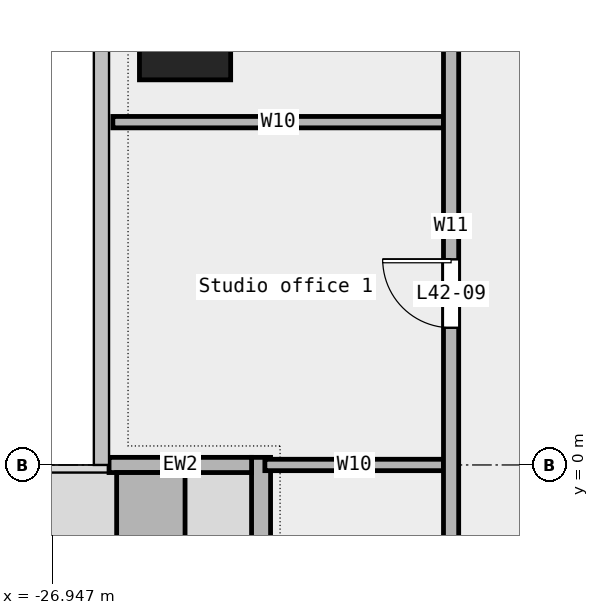
"""IFC4 building model, lengths in metres.
Left out: names, types, materials, properties, quantities, classifications, styles, units other than length and angle.
Written with IfcOpenShell. Run it as: python <this file> out.ifc"""

import sys

from ifc_helpers import new_model, si_unit, direction, frame, frame_2d, origin, origin_2d, place, context, subcontext, project, spatial, rectangle, extrude, element, fill, save


model = new_model("IFC4")
c1 = context("Model", 3, precision=1e-05, world=origin(), true_north=direction((0.0, 1.0)))
c2 = subcontext(c1, "Body", "Model", "MODEL_VIEW")
j1 = project(units=[si_unit("LENGTHUNIT", "METRE"), si_unit("PLANEANGLEUNIT", "RADIAN")], contexts=[c1])
p1 = place(None, origin())
s1 = spatial("IfcSite", under=j1, at=p1, CompositionType="ELEMENT")
p2 = place(p1, origin())
s2 = spatial("IfcBuilding", under=s1, at=p2, CompositionType="ELEMENT")
p3 = place(p2, frame((0.0, 0.0, 201.0)))
s3 = spatial("IfcBuildingStorey", under=s2, at=p3, CompositionType="ELEMENT", Elevation=201.0)
p4 = place(p3, frame((-25.2, 5.667, 0.0), z_axis=(0.0, 0.0, 1.0), x_axis=(1.0, 0.0, 0.0)))
e1 = element("IfcColumn", 1, at=p4, inside=s3, PredefinedType="COLUMN", context=c2, shape_type="SweptSolid", body=[
    extrude(rectangle(XDim=1.2, YDim=1.2, at=origin_2d()), origin(), (0.0, 0.0, 1.0), 3.4),
])
p5 = place(p3, frame((-24.2, 0.1, 0.0), z_axis=(0.0, 0.0, 1.0), x_axis=(0.0, -1.0, 0.0)))
e2 = element("IfcWall", 2, at=p5, inside=s3, PredefinedType="STANDARD", context=c2, shape_type="SweptSolid", body=[
    extrude(rectangle(XDim=12.95, YDim=0.25, at=frame_2d((6.475, 0.0))), origin(), (0.0, 0.0, 1.0), 3.4),
])
p6 = place(p5, frame((1.5, 0.0, 0.45)))
e3 = element("IfcOpeningElement", 3, at=p6, cuts=e2, PredefinedType="OPENING", context=c2, shape_type="SweptSolid", body=[
    extrude(rectangle(XDim=1.5, YDim=2.4, at=frame_2d((0.75, 1.2))), frame((0.0, 0.137, 0.0), z_axis=(0.0, -1.0, 0.0), x_axis=(1.0, 0.0, 0.0)), (0.0, 0.0, 1.0), 0.274),
])
p7 = place(p5, frame((6.75, 0.0, 0.0)))
e4 = element("IfcOpeningElement", 4, at=p7, cuts=e2, PredefinedType="OPENING", context=c2, shape_type="SweptSolid", body=[
    extrude(rectangle(XDim=1.8, YDim=2.4, at=frame_2d((0.9, 1.2))), frame((0.0, 0.137, 0.0), z_axis=(0.0, -1.0, 0.0), x_axis=(1.0, 0.0, 0.0)), (0.0, 0.0, 1.0), 0.274),
])
p8 = place(p5, frame((10.0, 0.0, 0.45)))
e5 = element("IfcOpeningElement", 5, at=p8, cuts=e2, PredefinedType="OPENING", context=c2, shape_type="SweptSolid", body=[
    extrude(rectangle(XDim=1.5, YDim=2.4, at=frame_2d((0.75, 1.2))), frame((0.0, 0.137, 0.0), z_axis=(0.0, -1.0, 0.0), x_axis=(1.0, 0.0, 0.0)), (0.0, 0.0, 1.0), 0.274),
])
p9 = place(p3, frame((-26.2, 0.0, 0.0), z_axis=(0.0, 0.0, 1.0), x_axis=(1.0, 0.0, 0.0)))
e6 = element("IfcWall", 6, at=p9, inside=s3, PredefinedType="STANDARD", context=c2, shape_type="SweptSolid", body=[
    extrude(rectangle(XDim=1.875, YDim=0.2, at=frame_2d((0.938, 0.0))), origin(), (0.0, 0.0, 1.0), 3.4),
])
p10 = place(p3, frame((-25.65, -0.1, 0.0), z_axis=(0.0, 0.0, 1.0), x_axis=(0.0, -1.0, 0.0)))
e7 = element("IfcWall", 7, at=p10, inside=s3, PredefinedType="STANDARD", context=c2, shape_type="SweptSolid", body=[
    extrude(rectangle(XDim=3.6, YDim=0.9, at=frame_2d((1.8, 0.0))), origin(), (0.0, 0.0, 1.0), 0.7),
])
p11 = place(p3, frame((-24.15, 0.0, 0.0), z_axis=(0.0, 0.0, 1.0), x_axis=(1.0, 0.0, 0.0)))
e8 = element("IfcWall", 8, at=p11, inside=s3, PredefinedType="PARTITIONING", context=c2, shape_type="SweptSolid", body=[
    extrude(rectangle(XDim=2.35, YDim=0.15, at=frame_2d((1.175, 0.0))), origin(), (0.0, 0.0, 1.0), 3.4),
])
p12 = place(p3, frame((-26.15, 4.51, 0.0), z_axis=(0.0, 0.0, 1.0), x_axis=(1.0, 0.0, 0.0)))
e9 = element("IfcWall", 9, at=p12, inside=s3, PredefinedType="PARTITIONING", context=c2, shape_type="SweptSolid", body=[
    extrude(rectangle(XDim=4.35, YDim=0.15, at=frame_2d((2.175, 0.0))), origin(), (0.0, 0.0, 1.0), 3.4),
])
p13 = place(p3, frame((-21.7, -9.0, 0.0), z_axis=(0.0, 0.0, 1.0), x_axis=(0.0, 1.0, 0.0)))
e10 = element("IfcWall", 10, at=p13, inside=s3, PredefinedType="PARTITIONING", context=c2, shape_type="SweptSolid", body=[
    extrude(rectangle(XDim=24.3, YDim=0.2, at=frame_2d((12.15, 0.0))), origin(), (0.0, 0.0, 1.0), 3.4),
])
p14 = place(p13, frame((18.305, 0.0, 0.0)))
e11 = element("IfcOpeningElement", 11, at=p14, cuts=e10, PredefinedType="OPENING", context=c2, shape_type="SweptSolid", body=[
    extrude(rectangle(XDim=1.2, YDim=2.1, at=frame_2d((0.6, 1.05))), frame((0.0, 0.112, 0.0), z_axis=(0.0, -1.0, 0.0), x_axis=(1.0, 0.0, 0.0)), (0.0, 0.0, 1.0), 0.224),
])
p15 = place(p13, frame((10.805, 0.0, 0.0)))
e12 = element("IfcOpeningElement", 12, at=p15, cuts=e10, PredefinedType="OPENING", context=c2, shape_type="SweptSolid", body=[
    extrude(rectangle(XDim=0.9, YDim=2.1, at=frame_2d((0.45, 1.05))), frame((0.0, 0.112, 0.0), z_axis=(0.0, -1.0, 0.0), x_axis=(1.0, 0.0, 0.0)), (0.0, 0.0, 1.0), 0.224),
])
p16 = place(p15, origin())
e13 = element("IfcDoor", 13, at=p16, inside=s3, OperationType="SINGLE_SWING_RIGHT", PredefinedType="DOOR", context=c2, shape_type="SweptSolid", body=[
    extrude(rectangle(XDim=0.9, YDim=2.1, at=frame_2d((0.45, 1.05))), frame((0.0, 0.025, 0.0), z_axis=(0.0, -1.0, 0.0), x_axis=(1.0, 0.0, 0.0)), (0.0, 0.0, 1.0), 0.05),
])
fill(e12, e13)
save(model, sys.argv[1])
